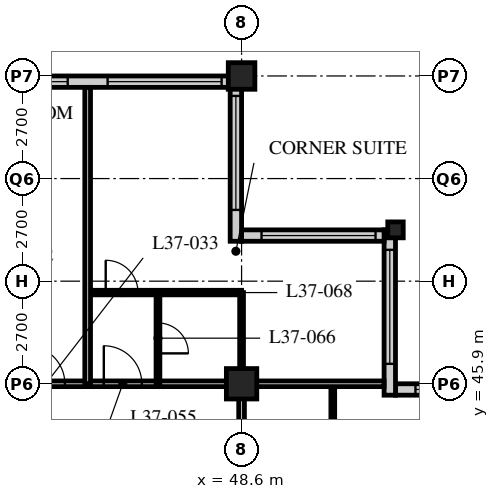
"""IFC4 building model, lengths in metres.
Left out: names, types, materials, properties, quantities, classifications, styles, units other than length and angle.
Written with IfcOpenShell. Run it as: python <this file> out.ifc"""

import sys

from ifc_helpers import new_model, si_unit, direction, frame, frame_2d, origin, origin_2d, place, context, subcontext, project, spatial, rectangle, hollow_rectangle, i_section, extrude, element, fill, save


model = new_model("IFC4")
c1 = context("Model", 3, precision=1e-05, world=origin(), true_north=direction((0.0, 1.0)))
c2 = subcontext(c1, "Body", "Model", "MODEL_VIEW")
j1 = project(units=[si_unit("LENGTHUNIT", "METRE"), si_unit("PLANEANGLEUNIT", "RADIAN")], contexts=[c1])
p1 = place(None, origin())
s1 = spatial("IfcSite", under=j1, at=p1, CompositionType="ELEMENT")
p2 = place(p1, origin())
s2 = spatial("IfcBuilding", under=s1, at=p2, CompositionType="ELEMENT")
p3 = place(p2, frame((0.0, 0.0, 144.2)))
s3 = spatial("IfcBuildingStorey", under=s2, at=p3, CompositionType="ELEMENT", Elevation=144.2)
p4 = place(p3, frame((48.6, 45.9, 0.0), z_axis=(0.0, 0.0, 1.0), x_axis=(1.0, 0.0, 0.0)))
e1 = element("IfcColumn", 1, at=p4, inside=s3, PredefinedType="COLUMN", context=c2, shape_type="SweptSolid", body=[
    extrude(hollow_rectangle(XDim=0.8, YDim=0.8, WallThickness=0.08, at=origin_2d()), origin(), (0.0, 0.0, 1.0), 3.4),
])
p5 = place(p3, frame((48.6, 54.0, 0.0), z_axis=(0.0, 0.0, 1.0), x_axis=(1.0, 0.0, 0.0)))
e2 = element("IfcColumn", 2, at=p5, inside=s3, PredefinedType="COLUMN", context=c2, shape_type="SweptSolid", body=[
    extrude(hollow_rectangle(XDim=0.7, YDim=0.7, WallThickness=0.07, at=origin_2d()), origin(), (0.0, 0.0, 1.0), 3.4),
])
p6 = place(p3, frame((52.65, 49.95, 0.0), z_axis=(0.0, 0.0, 1.0), x_axis=(1.0, 0.0, 0.0)))
e3 = element("IfcColumn", 3, at=p6, inside=s3, PredefinedType="COLUMN", context=c2, shape_type="SweptSolid", body=[
    extrude(i_section(OverallWidth=0.407, OverallDepth=0.419, WebThickness=0.031, FlangeThickness=0.049, FilletRadius=0.015, at=origin_2d()), origin(), (0.0, 0.0, 1.0), 3.4),
])
p7 = place(p3, frame((56.4, 45.75, 0.0), z_axis=(0.0, 0.0, 1.0), x_axis=(-1.0, 0.0, 0.0)))
e4 = element("IfcWall", 4, at=p7, inside=s3, PredefinedType="SOLIDWALL", context=c2, shape_type="SweptSolid", body=[
    extrude(rectangle(XDim=3.75, YDim=0.3, at=frame_2d((1.875, 0.0))), origin(), (0.0, 0.0, 1.0), 3.19),
])
p8 = place(p7, frame((0.225, 0.0, 0.9)))
e5 = element("IfcOpeningElement", 5, at=p8, cuts=e4, PredefinedType="OPENING", context=c2, shape_type="SweptSolid", body=[
    extrude(rectangle(XDim=3.0, YDim=1.4, at=frame_2d((1.5, 0.7))), frame((0.0, 0.16, 0.0), z_axis=(0.0, -1.0, 0.0), x_axis=(1.0, 0.0, 0.0)), (0.0, 0.0, 1.0), 0.32),
])
p9 = place(p3, frame((52.5, 45.6, 0.0), z_axis=(0.0, 0.0, 1.0), x_axis=(0.0, 1.0, 0.0)))
e6 = element("IfcWall", 6, at=p9, inside=s3, PredefinedType="SOLIDWALL", context=c2, shape_type="SweptSolid", body=[
    extrude(rectangle(XDim=4.35, YDim=0.3, at=frame_2d((2.175, 0.0))), origin(), (0.0, 0.0, 1.0), 3.19),
])
p10 = place(p9, frame((0.825, 0.0, 0.9)))
e7 = element("IfcOpeningElement", 7, at=p10, cuts=e6, PredefinedType="OPENING", context=c2, shape_type="SweptSolid", body=[
    extrude(rectangle(XDim=3.0, YDim=1.4, at=frame_2d((1.5, 0.7))), frame((0.0, 0.16, 0.0), z_axis=(0.0, -1.0, 0.0), x_axis=(1.0, 0.0, 0.0)), (0.0, 0.0, 1.0), 0.32),
])
p11 = place(p3, frame((52.35, 49.8, 0.0), z_axis=(0.0, 0.0, 1.0), x_axis=(-1.0, 0.0, 0.0)))
e8 = element("IfcWall", 8, at=p11, inside=s3, PredefinedType="SOLIDWALL", context=c2, shape_type="SweptSolid", body=[
    extrude(rectangle(XDim=3.75, YDim=0.3, at=frame_2d((1.875, 0.0))), origin(), (0.0, 0.0, 1.0), 3.19),
])
p12 = place(p11, frame((0.225, 0.0, 0.9)))
e9 = element("IfcOpeningElement", 9, at=p12, cuts=e8, PredefinedType="OPENING", context=c2, shape_type="SweptSolid", body=[
    extrude(rectangle(XDim=3.0, YDim=1.4, at=frame_2d((1.5, 0.7))), frame((0.0, 0.16, 0.0), z_axis=(0.0, -1.0, 0.0), x_axis=(1.0, 0.0, 0.0)), (0.0, 0.0, 1.0), 0.32),
])
p13 = place(p3, frame((48.45, 49.65, 0.0), z_axis=(0.0, 0.0, 1.0), x_axis=(0.0, 1.0, 0.0)))
e10 = element("IfcWall", 10, at=p13, inside=s3, PredefinedType="SOLIDWALL", context=c2, shape_type="SweptSolid", body=[
    extrude(rectangle(XDim=4.35, YDim=0.3, at=frame_2d((2.175, 0.0))), origin(), (0.0, 0.0, 1.0), 3.19),
])
p14 = place(p13, frame((0.825, 0.0, 0.9)))
e11 = element("IfcOpeningElement", 11, at=p14, cuts=e10, PredefinedType="OPENING", context=c2, shape_type="SweptSolid", body=[
    extrude(rectangle(XDim=3.0, YDim=1.4, at=frame_2d((1.5, 0.7))), frame((0.0, 0.16, 0.0), z_axis=(0.0, -1.0, 0.0), x_axis=(1.0, 0.0, 0.0)), (0.0, 0.0, 1.0), 0.32),
])
p15 = place(p3, frame((48.3, 53.85, 0.0), z_axis=(0.0, 0.0, 1.0), x_axis=(-1.0, 0.0, 0.0)))
e12 = element("IfcWall", 12, at=p15, inside=s3, PredefinedType="SOLIDWALL", context=c2, shape_type="SweptSolid", body=[
    extrude(rectangle(XDim=40.2, YDim=0.3, at=frame_2d((20.1, 0.0))), origin(), (0.0, 0.0, 1.0), 3.19),
])
p16 = place(p15, frame((0.225, 0.0, 0.9)))
e13 = element("IfcOpeningElement", 13, at=p16, cuts=e12, PredefinedType="OPENING", context=c2, shape_type="SweptSolid", body=[
    extrude(rectangle(XDim=3.0, YDim=1.4, at=frame_2d((1.5, 0.7))), frame((0.0, 0.16, 0.0), z_axis=(0.0, -1.0, 0.0), x_axis=(1.0, 0.0, 0.0)), (0.0, 0.0, 1.0), 0.32),
])
p17 = place(p15, frame((4.275, 0.0, 0.9)))
e14 = element("IfcOpeningElement", 14, at=p17, cuts=e12, PredefinedType="OPENING", context=c2, shape_type="SweptSolid", body=[
    extrude(rectangle(XDim=3.0, YDim=1.4, at=frame_2d((1.5, 0.7))), frame((0.0, 0.16, 0.0), z_axis=(0.0, -1.0, 0.0), x_axis=(1.0, 0.0, 0.0)), (0.0, 0.0, 1.0), 0.32),
])
p18 = place(p15, frame((8.325, 0.0, 0.9)))
e15 = element("IfcOpeningElement", 15, at=p18, cuts=e12, PredefinedType="OPENING", context=c2, shape_type="SweptSolid", body=[
    extrude(rectangle(XDim=3.0, YDim=1.4, at=frame_2d((1.5, 0.7))), frame((0.0, 0.16, 0.0), z_axis=(0.0, -1.0, 0.0), x_axis=(1.0, 0.0, 0.0)), (0.0, 0.0, 1.0), 0.32),
])
p19 = place(p15, frame((12.375, 0.0, 0.9)))
e16 = element("IfcOpeningElement", 16, at=p19, cuts=e12, PredefinedType="OPENING", context=c2, shape_type="SweptSolid", body=[
    extrude(rectangle(XDim=3.0, YDim=1.4, at=frame_2d((1.5, 0.7))), frame((0.0, 0.16, 0.0), z_axis=(0.0, -1.0, 0.0), x_axis=(1.0, 0.0, 0.0)), (0.0, 0.0, 1.0), 0.32),
])
p20 = place(p15, frame((16.425, 0.0, 0.9)))
e17 = element("IfcOpeningElement", 17, at=p20, cuts=e12, PredefinedType="OPENING", context=c2, shape_type="SweptSolid", body=[
    extrude(rectangle(XDim=3.0, YDim=1.4, at=frame_2d((1.5, 0.7))), frame((0.0, 0.16, 0.0), z_axis=(0.0, -1.0, 0.0), x_axis=(1.0, 0.0, 0.0)), (0.0, 0.0, 1.0), 0.32),
])
p21 = place(p15, frame((20.475, 0.0, 0.9)))
e18 = element("IfcOpeningElement", 18, at=p21, cuts=e12, PredefinedType="OPENING", context=c2, shape_type="SweptSolid", body=[
    extrude(rectangle(XDim=3.0, YDim=1.4, at=frame_2d((1.5, 0.7))), frame((0.0, 0.16, 0.0), z_axis=(0.0, -1.0, 0.0), x_axis=(1.0, 0.0, 0.0)), (0.0, 0.0, 1.0), 0.32),
])
p22 = place(p15, frame((24.525, 0.0, 0.9)))
e19 = element("IfcOpeningElement", 19, at=p22, cuts=e12, PredefinedType="OPENING", context=c2, shape_type="SweptSolid", body=[
    extrude(rectangle(XDim=3.0, YDim=1.4, at=frame_2d((1.5, 0.7))), frame((0.0, 0.16, 0.0), z_axis=(0.0, -1.0, 0.0), x_axis=(1.0, 0.0, 0.0)), (0.0, 0.0, 1.0), 0.32),
])
p23 = place(p15, frame((28.575, 0.0, 0.9)))
e20 = element("IfcOpeningElement", 20, at=p23, cuts=e12, PredefinedType="OPENING", context=c2, shape_type="SweptSolid", body=[
    extrude(rectangle(XDim=3.0, YDim=1.4, at=frame_2d((1.5, 0.7))), frame((0.0, 0.16, 0.0), z_axis=(0.0, -1.0, 0.0), x_axis=(1.0, 0.0, 0.0)), (0.0, 0.0, 1.0), 0.32),
])
p24 = place(p15, frame((32.625, 0.0, 0.9)))
e21 = element("IfcOpeningElement", 21, at=p24, cuts=e12, PredefinedType="OPENING", context=c2, shape_type="SweptSolid", body=[
    extrude(rectangle(XDim=3.0, YDim=1.4, at=frame_2d((1.5, 0.7))), frame((0.0, 0.16, 0.0), z_axis=(0.0, -1.0, 0.0), x_axis=(1.0, 0.0, 0.0)), (0.0, 0.0, 1.0), 0.32),
])
p25 = place(p15, frame((36.675, 0.0, 0.9)))
e22 = element("IfcOpeningElement", 22, at=p25, cuts=e12, PredefinedType="OPENING", context=c2, shape_type="SweptSolid", body=[
    extrude(rectangle(XDim=3.0, YDim=1.4, at=frame_2d((1.5, 0.7))), frame((0.0, 0.16, 0.0), z_axis=(0.0, -1.0, 0.0), x_axis=(1.0, 0.0, 0.0)), (0.0, 0.0, 1.0), 0.32),
])
p26 = place(p3, frame((12.15, 45.9, 0.0), z_axis=(0.0, 0.0, 1.0), x_axis=(1.0, 0.0, 0.0)))
e23 = element("IfcWall", 23, at=p26, inside=s3, PredefinedType="PARTITIONING", context=c2, shape_type="SweptSolid", body=[
    extrude(rectangle(XDim=36.45, YDim=0.15, at=frame_2d((18.225, 0.0))), origin(), (0.0, 0.0, 1.0), 2.42),
])
p27 = place(p26, frame((9.225, 0.0, 0.0)))
e24 = element("IfcOpeningElement", 24, at=p27, cuts=e23, PredefinedType="OPENING", context=c2, shape_type="SweptSolid", body=[
    extrude(rectangle(XDim=1.8, YDim=2.4, at=frame_2d((0.9, 1.2))), frame((0.0, 0.085, 0.0), z_axis=(0.0, -1.0, 0.0), x_axis=(1.0, 0.0, 0.0)), (0.0, 0.0, 1.0), 0.17),
])
p28 = place(p26, frame((21.65, 0.0, 0.0)))
e25 = element("IfcOpeningElement", 25, at=p28, cuts=e23, PredefinedType="OPENING", context=c2, shape_type="SweptSolid", body=[
    extrude(rectangle(XDim=1.0, YDim=2.1, at=frame_2d((0.5, 1.05))), frame((0.0, 0.085, 0.0), z_axis=(0.0, -1.0, 0.0), x_axis=(1.0, 0.0, 0.0)), (0.0, 0.0, 1.0), 0.17),
])
p29 = place(p26, frame((24.9, 0.0, 0.0)))
e26 = element("IfcOpeningElement", 26, at=p29, cuts=e23, PredefinedType="OPENING", context=c2, shape_type="SweptSolid", body=[
    extrude(rectangle(XDim=1.0, YDim=2.1, at=frame_2d((0.5, 1.05))), frame((0.0, 0.085, 0.0), z_axis=(0.0, -1.0, 0.0), x_axis=(1.0, 0.0, 0.0)), (0.0, 0.0, 1.0), 0.17),
])
p30 = place(p26, frame((30.8, 0.0, 0.0)))
e27 = element("IfcOpeningElement", 27, at=p30, cuts=e23, PredefinedType="OPENING", context=c2, shape_type="SweptSolid", body=[
    extrude(rectangle(XDim=1.0, YDim=2.1, at=frame_2d((0.5, 1.05))), frame((0.0, 0.085, 0.0), z_axis=(0.0, -1.0, 0.0), x_axis=(1.0, 0.0, 0.0)), (0.0, 0.0, 1.0), 0.17),
])
p31 = place(p26, frame((32.825, 0.0, 0.0)))
e28 = element("IfcOpeningElement", 28, at=p31, cuts=e23, PredefinedType="OPENING", context=c2, shape_type="SweptSolid", body=[
    extrude(rectangle(XDim=1.0, YDim=2.1, at=frame_2d((0.5, 1.05))), frame((0.0, 0.085, 0.0), z_axis=(0.0, -1.0, 0.0), x_axis=(1.0, 0.0, 0.0)), (0.0, 0.0, 1.0), 0.17),
])
p32 = place(p26, frame((1.525, 0.0, 0.0)))
e29 = element("IfcOpeningElement", 29, at=p32, cuts=e23, PredefinedType="OPENING", context=c2, shape_type="SweptSolid", body=[
    extrude(rectangle(XDim=1.0, YDim=2.1, at=frame_2d((0.5, 1.05))), frame((0.0, 0.085, 0.0), z_axis=(0.0, -1.0, 0.0), x_axis=(1.0, 0.0, 0.0)), (0.0, 0.0, 1.0), 0.17),
])
p33 = place(p3, frame((48.6, 21.6, 0.0), z_axis=(0.0, 0.0, 1.0), x_axis=(0.0, 1.0, 0.0)))
e30 = element("IfcWall", 30, at=p33, inside=s3, PredefinedType="PARTITIONING", context=c2, shape_type="SweptSolid", body=[
    extrude(rectangle(XDim=24.3, YDim=0.15, at=frame_2d((12.15, 0.0))), origin(), (0.0, 0.0, 1.0), 2.42),
])
p34 = place(p33, frame((2.75, 0.0, 0.0)))
e31 = element("IfcOpeningElement", 31, at=p34, cuts=e30, PredefinedType="OPENING", context=c2, shape_type="SweptSolid", body=[
    extrude(rectangle(XDim=1.0, YDim=2.1, at=frame_2d((0.5, 1.05))), frame((0.0, 0.085, 0.0), z_axis=(0.0, -1.0, 0.0), x_axis=(1.0, 0.0, 0.0)), (0.0, 0.0, 1.0), 0.17),
])
p35 = place(p33, frame((4.65, 0.0, 0.0)))
e32 = element("IfcOpeningElement", 32, at=p35, cuts=e30, PredefinedType="OPENING", context=c2, shape_type="SweptSolid", body=[
    extrude(rectangle(XDim=1.0, YDim=2.1, at=frame_2d((0.5, 1.05))), frame((0.0, 0.085, 0.0), z_axis=(0.0, -1.0, 0.0), x_axis=(1.0, 0.0, 0.0)), (0.0, 0.0, 1.0), 0.17),
])
p36 = place(p33, frame((13.675, 0.0, 0.0)))
e33 = element("IfcOpeningElement", 33, at=p36, cuts=e30, PredefinedType="OPENING", context=c2, shape_type="SweptSolid", body=[
    extrude(rectangle(XDim=1.0, YDim=2.1, at=frame_2d((0.5, 1.05))), frame((0.0, 0.085, 0.0), z_axis=(0.0, -1.0, 0.0), x_axis=(1.0, 0.0, 0.0)), (0.0, 0.0, 1.0), 0.17),
])
p37 = place(p33, frame((20.85, 0.0, 0.0)))
e34 = element("IfcOpeningElement", 34, at=p37, cuts=e30, PredefinedType="OPENING", context=c2, shape_type="SweptSolid", body=[
    extrude(rectangle(XDim=1.0, YDim=2.1, at=frame_2d((0.5, 1.05))), frame((0.0, 0.085, 0.0), z_axis=(0.0, -1.0, 0.0), x_axis=(1.0, 0.0, 0.0)), (0.0, 0.0, 1.0), 0.17),
])
p38 = place(p3, frame((51.0, 43.6, 0.0), z_axis=(0.0, 0.0, 1.0), x_axis=(0.0, 1.0, 0.0)))
e35 = element("IfcWall", 35, at=p38, inside=s3, PredefinedType="PARTITIONING", context=c2, shape_type="SweptSolid", body=[
    extrude(rectangle(XDim=2.3, YDim=0.1, at=frame_2d((1.15, 0.0))), origin(), (0.0, 0.0, 1.0), 3.19),
])
p39 = place(p3, frame((44.55, 48.3, 0.0), z_axis=(0.0, 0.0, 1.0), x_axis=(1.0, 0.0, 0.0)))
e36 = element("IfcWall", 36, at=p39, inside=s3, PredefinedType="PARTITIONING", context=c2, shape_type="SweptSolid", body=[
    extrude(rectangle(XDim=4.05, YDim=0.12, at=frame_2d((2.025, 0.0))), origin(), (0.0, 0.0, 1.0), 3.19),
])
p40 = place(p39, frame((0.475, 0.0, 0.0)))
e37 = element("IfcOpeningElement", 37, at=p40, cuts=e36, PredefinedType="OPENING", context=c2, shape_type="SweptSolid", body=[
    extrude(rectangle(XDim=0.85, YDim=2.1, at=frame_2d((0.425, 1.05))), frame((0.0, 0.07, 0.0), z_axis=(0.0, -1.0, 0.0), x_axis=(1.0, 0.0, 0.0)), (0.0, 0.0, 1.0), 0.14),
])
p41 = place(p3, frame((46.4, 45.9, 0.0), z_axis=(0.0, 0.0, 1.0), x_axis=(0.0, 1.0, 0.0)))
e38 = element("IfcWall", 38, at=p41, inside=s3, PredefinedType="PARTITIONING", context=c2, shape_type="SweptSolid", body=[
    extrude(rectangle(XDim=2.4, YDim=0.1, at=frame_2d((1.2, 0.0))), origin(), (0.0, 0.0, 1.0), 3.19),
])
p42 = place(p41, frame((0.8, 0.0, 0.0)))
e39 = element("IfcOpeningElement", 39, at=p42, cuts=e38, PredefinedType="OPENING", context=c2, shape_type="SweptSolid", body=[
    extrude(rectangle(XDim=0.8, YDim=2.1, at=frame_2d((0.4, 1.05))), frame((0.0, 0.06, 0.0), z_axis=(0.0, -1.0, 0.0), x_axis=(1.0, 0.0, 0.0)), (0.0, 0.0, 1.0), 0.12),
])
p43 = place(p3, frame((48.6, 45.9, 0.0), z_axis=(0.0, 0.0, 1.0), x_axis=(0.0, 1.0, 0.0)))
e40 = element("IfcWall", 40, at=p43, inside=s3, PredefinedType="PARTITIONING", context=c2, shape_type="SweptSolid", body=[
    extrude(rectangle(XDim=2.4, YDim=0.1, at=frame_2d((1.2, 0.0))), origin(), (0.0, 0.0, 1.0), 2.42),
])
p44 = place(p3, frame((48.6, 45.9, 0.0), z_axis=(0.0, 0.0, 1.0), x_axis=(1.0, 0.0, 0.0)))
e41 = element("IfcWall", 41, at=p44, inside=s3, PredefinedType="PARTITIONING", context=c2, shape_type="SweptSolid", body=[
    extrude(rectangle(XDim=3.75, YDim=0.15, at=frame_2d((1.875, 0.0))), origin(), (0.0, 0.0, 1.0), 2.42),
])
p45 = place(p3, frame((44.55, 45.9, 0.0), z_axis=(0.0, 0.0, 1.0), x_axis=(0.0, 1.0, 0.0)))
e42 = element("IfcWall", 42, at=p45, inside=s3, PredefinedType="PARTITIONING", context=c2, shape_type="SweptSolid", body=[
    extrude(rectangle(XDim=7.8, YDim=0.15, at=frame_2d((3.9, 0.0))), origin(), (0.0, 0.0, 1.0), 3.19),
])
p46 = place(p8, origin())
e43 = element("IfcWindow", 43, at=p46, inside=s3, PartitioningType="SINGLE_PANEL", PredefinedType="WINDOW", context=c2, shape_type="SweptSolid", body=[
    extrude(rectangle(XDim=3.0, YDim=1.4, at=frame_2d((1.5, 0.7))), frame((0.0, 0.03, 0.0), z_axis=(0.0, -1.0, 0.0), x_axis=(1.0, 0.0, 0.0)), (0.0, 0.0, 1.0), 0.06),
])
fill(e5, e43)
p47 = place(p10, origin())
e44 = element("IfcWindow", 44, at=p47, inside=s3, PartitioningType="SINGLE_PANEL", PredefinedType="WINDOW", context=c2, shape_type="SweptSolid", body=[
    extrude(rectangle(XDim=3.0, YDim=1.4, at=frame_2d((1.5, 0.7))), frame((0.0, 0.03, 0.0), z_axis=(0.0, -1.0, 0.0), x_axis=(1.0, 0.0, 0.0)), (0.0, 0.0, 1.0), 0.06),
])
fill(e7, e44)
p48 = place(p12, origin())
e45 = element("IfcWindow", 45, at=p48, inside=s3, PartitioningType="SINGLE_PANEL", PredefinedType="WINDOW", context=c2, shape_type="SweptSolid", body=[
    extrude(rectangle(XDim=3.0, YDim=1.4, at=frame_2d((1.5, 0.7))), frame((0.0, 0.03, 0.0), z_axis=(0.0, -1.0, 0.0), x_axis=(1.0, 0.0, 0.0)), (0.0, 0.0, 1.0), 0.06),
])
fill(e9, e45)
p49 = place(p14, origin())
e46 = element("IfcWindow", 46, at=p49, inside=s3, PartitioningType="SINGLE_PANEL", PredefinedType="WINDOW", context=c2, shape_type="SweptSolid", body=[
    extrude(rectangle(XDim=3.0, YDim=1.4, at=frame_2d((1.5, 0.7))), frame((0.0, 0.03, 0.0), z_axis=(0.0, -1.0, 0.0), x_axis=(1.0, 0.0, 0.0)), (0.0, 0.0, 1.0), 0.06),
])
fill(e11, e46)
p50 = place(p16, origin())
e47 = element("IfcWindow", 47, at=p50, inside=s3, PartitioningType="SINGLE_PANEL", PredefinedType="WINDOW", context=c2, shape_type="SweptSolid", body=[
    extrude(rectangle(XDim=3.0, YDim=1.4, at=frame_2d((1.5, 0.7))), frame((0.0, 0.03, 0.0), z_axis=(0.0, -1.0, 0.0), x_axis=(1.0, 0.0, 0.0)), (0.0, 0.0, 1.0), 0.06),
])
fill(e13, e47)
p51 = place(p17, origin())
e48 = element("IfcWindow", 48, at=p51, inside=s3, PartitioningType="SINGLE_PANEL", PredefinedType="WINDOW", context=c2, shape_type="SweptSolid", body=[
    extrude(rectangle(XDim=3.0, YDim=1.4, at=frame_2d((1.5, 0.7))), frame((0.0, 0.03, 0.0), z_axis=(0.0, -1.0, 0.0), x_axis=(1.0, 0.0, 0.0)), (0.0, 0.0, 1.0), 0.06),
])
fill(e14, e48)
p52 = place(p30, origin())
e49 = element("IfcDoor", 49, at=p52, inside=s3, OperationType="SINGLE_SWING_LEFT", PredefinedType="DOOR", context=c2, shape_type="SweptSolid", body=[
    extrude(rectangle(XDim=1.0, YDim=2.1, at=frame_2d((0.5, 1.05))), frame((0.0, 0.025, 0.0), z_axis=(0.0, -1.0, 0.0), x_axis=(1.0, 0.0, 0.0)), (0.0, 0.0, 1.0), 0.05),
])
fill(e27, e49)
p53 = place(p42, origin())
e50 = element("IfcDoor", 50, at=p53, inside=s3, OperationType="SINGLE_SWING_RIGHT", PredefinedType="DOOR", context=c2, shape_type="SweptSolid", body=[
    extrude(rectangle(XDim=0.8, YDim=2.1, at=frame_2d((0.4, 1.05))), frame((0.0, 0.025, 0.0), z_axis=(0.0, -1.0, 0.0), x_axis=(1.0, 0.0, 0.0)), (0.0, 0.0, 1.0), 0.05),
])
fill(e39, e50)
p54 = place(p31, origin())
e51 = element("IfcDoor", 51, at=p54, inside=s3, OperationType="SINGLE_SWING_LEFT", PredefinedType="DOOR", context=c2, shape_type="SweptSolid", body=[
    extrude(rectangle(XDim=1.0, YDim=2.1, at=frame_2d((0.5, 1.05))), frame((0.0, 0.025, 0.0), z_axis=(0.0, -1.0, 0.0), x_axis=(1.0, 0.0, 0.0)), (0.0, 0.0, 1.0), 0.05),
])
fill(e28, e51)
p55 = place(p40, origin())
e52 = element("IfcDoor", 52, at=p55, inside=s3, OperationType="SINGLE_SWING_LEFT", PredefinedType="DOOR", context=c2, shape_type="SweptSolid", body=[
    extrude(rectangle(XDim=0.85, YDim=2.1, at=frame_2d((0.425, 1.05))), frame((0.0, 0.025, 0.0), z_axis=(0.0, -1.0, 0.0), x_axis=(1.0, 0.0, 0.0)), (0.0, 0.0, 1.0), 0.05),
])
fill(e37, e52)
save(model, sys.argv[1])
